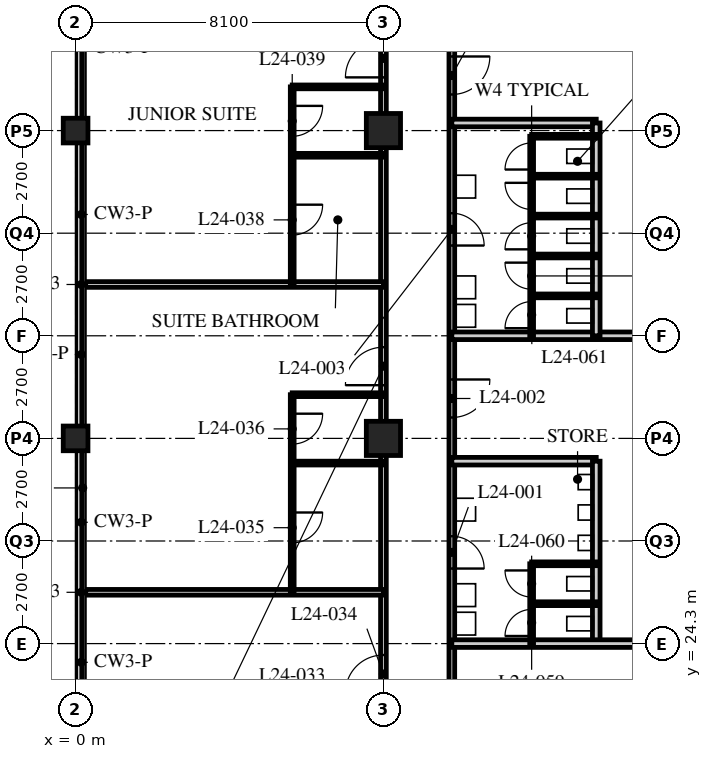
"""IFC4 building model, lengths in metres.
Left out: names, types, materials, properties, quantities, classifications, styles, units other than length and angle.
Written with IfcOpenShell. Run it as: python <this file> out.ifc"""

import sys

from ifc_helpers import new_model, si_unit, direction, frame, frame_2d, origin, origin_2d, place, context, subcontext, project, spatial, rectangle, hollow_rectangle, extrude, element, fill, save


model = new_model("IFC4")
c1 = context("Model", 3, precision=1e-05, world=origin(), true_north=direction((0.0, 1.0)))
c2 = subcontext(c1, "Body", "Model", "MODEL_VIEW")
j1 = project(units=[si_unit("LENGTHUNIT", "METRE"), si_unit("PLANEANGLEUNIT", "RADIAN")], contexts=[c1])
p1 = place(None, origin())
s1 = spatial("IfcSite", under=j1, at=p1, CompositionType="ELEMENT")
p2 = place(p1, origin())
s2 = spatial("IfcBuilding", under=s1, at=p2, CompositionType="ELEMENT")
p3 = place(p2, frame((0.0, 0.0, 98.0)))
s3 = spatial("IfcBuildingStorey", under=s2, at=p3, CompositionType="ELEMENT", Elevation=98.0)
for number, where, z_axis, x_axis in (
    (1, (0.0, 29.7, 0.0), (0.0, 0.0, 1.0), (1.0, 0.0, 0.0)),
    (2, (0.0, 37.8, 0.0), (0.0, 0.0, 1.0), (1.0, 0.0, 0.0)),
):
    element("IfcColumn", number, at=place(p3, frame(where, z_axis=z_axis, x_axis=x_axis)), inside=s3, PredefinedType="COLUMN", context=c2, shape_type="SweptSolid", body=[
        extrude(hollow_rectangle(XDim=0.65, YDim=0.65, WallThickness=0.05, at=origin_2d()), origin(), (0.0, 0.0, 1.0), 5.4),
    ])
for number, where, z_axis, x_axis in (
    (3, (8.1, 29.7, 0.0), (0.0, 0.0, 1.0), (1.0, 0.0, 0.0)),
    (4, (8.1, 37.8, 0.0), (0.0, 0.0, 1.0), (1.0, 0.0, 0.0)),
):
    element("IfcColumn", number, at=place(p3, frame(where, z_axis=z_axis, x_axis=x_axis)), inside=s3, PredefinedType="COLUMN", context=c2, shape_type="SweptSolid", body=[
        extrude(hollow_rectangle(XDim=0.9, YDim=0.9, WallThickness=0.1, at=origin_2d()), origin(), (0.0, 0.0, 1.0), 5.4),
    ])
p4 = place(p3, frame((8.1, 13.5, 0.0), z_axis=(0.0, 0.0, 1.0), x_axis=(0.0, 1.0, 0.0)))
e5 = element("IfcWall", 5, at=p4, inside=s3, PredefinedType="PARTITIONING", context=c2, shape_type="SweptSolid", body=[
    extrude(rectangle(XDim=32.435, YDim=0.15, at=frame_2d((16.218, 0.0))), origin(), (0.0, 0.0, 1.0), 4.49),
])
p5 = place(p4, frame((1.525, 0.0, 0.0)))
e6 = element("IfcOpeningElement", 6, at=p5, cuts=e5, PredefinedType="OPENING", context=c2, shape_type="SweptSolid", body=[
    extrude(rectangle(XDim=1.0, YDim=2.1, at=frame_2d((0.5, 1.05))), frame((0.0, 0.085, 0.0), z_axis=(0.0, -1.0, 0.0), x_axis=(1.0, 0.0, 0.0)), (0.0, 0.0, 1.0), 0.17),
])
p6 = place(p4, frame((9.5, 0.0, 0.0)))
e7 = element("IfcOpeningElement", 7, at=p6, cuts=e5, PredefinedType="OPENING", context=c2, shape_type="SweptSolid", body=[
    extrude(rectangle(XDim=1.0, YDim=2.1, at=frame_2d((0.5, 1.05))), frame((0.0, 0.085, 0.0), z_axis=(0.0, -1.0, 0.0), x_axis=(1.0, 0.0, 0.0)), (0.0, 0.0, 1.0), 0.17),
])
p7 = place(p4, frame((17.6, 0.0, 0.0)))
e8 = element("IfcOpeningElement", 8, at=p7, cuts=e5, PredefinedType="OPENING", context=c2, shape_type="SweptSolid", body=[
    extrude(rectangle(XDim=1.0, YDim=2.1, at=frame_2d((0.5, 1.05))), frame((0.0, 0.085, 0.0), z_axis=(0.0, -1.0, 0.0), x_axis=(1.0, 0.0, 0.0)), (0.0, 0.0, 1.0), 0.17),
])
p8 = place(p4, frame((25.7, 0.0, 0.0)))
e9 = element("IfcOpeningElement", 9, at=p8, cuts=e5, PredefinedType="OPENING", context=c2, shape_type="SweptSolid", body=[
    extrude(rectangle(XDim=1.0, YDim=2.1, at=frame_2d((0.5, 1.05))), frame((0.0, 0.085, 0.0), z_axis=(0.0, -1.0, 0.0), x_axis=(1.0, 0.0, 0.0)), (0.0, 0.0, 1.0), 0.17),
])
p9 = place(p4, frame((28.95, 0.0, 0.0)))
e10 = element("IfcOpeningElement", 10, at=p9, cuts=e5, PredefinedType="OPENING", context=c2, shape_type="SweptSolid", body=[
    extrude(rectangle(XDim=1.0, YDim=2.1, at=frame_2d((0.5, 1.05))), frame((0.0, 0.085, 0.0), z_axis=(0.0, -1.0, 0.0), x_axis=(1.0, 0.0, 0.0)), (0.0, 0.0, 1.0), 0.17),
])
p10 = place(p3, frame((9.9, 44.1, 0.0), z_axis=(0.0, 0.0, 1.0), x_axis=(0.0, -1.0, 0.0)))
e11 = element("IfcWall", 11, at=p10, inside=s3, PredefinedType="PARTITIONING", context=c2, shape_type="SweptSolid", body=[
    extrude(rectangle(XDim=28.8, YDim=0.15, at=frame_2d((14.4, 0.0))), origin(), (0.0, 0.0, 1.0), 5.19),
])
p11 = place(p10, frame((16.975, 0.0, 0.0)))
e12 = element("IfcOpeningElement", 12, at=p11, cuts=e11, PredefinedType="OPENING", context=c2, shape_type="SweptSolid", body=[
    extrude(rectangle(XDim=0.85, YDim=2.1, at=frame_2d((0.425, 1.05))), frame((0.0, 0.085, 0.0), z_axis=(0.0, -1.0, 0.0), x_axis=(1.0, 0.0, 0.0)), (0.0, 0.0, 1.0), 0.17),
])
p12 = place(p10, frame((12.85, 0.0, 0.0)))
e13 = element("IfcOpeningElement", 13, at=p12, cuts=e11, PredefinedType="OPENING", context=c2, shape_type="SweptSolid", body=[
    extrude(rectangle(XDim=1.0, YDim=2.1, at=frame_2d((0.5, 1.05))), frame((0.0, 0.085, 0.0), z_axis=(0.0, -1.0, 0.0), x_axis=(1.0, 0.0, 0.0)), (0.0, 0.0, 1.0), 0.17),
])
p13 = place(p10, frame((8.475, 0.0, 0.0)))
e14 = element("IfcOpeningElement", 14, at=p13, cuts=e11, PredefinedType="OPENING", context=c2, shape_type="SweptSolid", body=[
    extrude(rectangle(XDim=0.85, YDim=2.1, at=frame_2d((0.425, 1.05))), frame((0.0, 0.085, 0.0), z_axis=(0.0, -1.0, 0.0), x_axis=(1.0, 0.0, 0.0)), (0.0, 0.0, 1.0), 0.17),
])
p14 = place(p10, frame((4.35, 0.0, 0.0)))
e15 = element("IfcOpeningElement", 15, at=p14, cuts=e11, PredefinedType="OPENING", context=c2, shape_type="SweptSolid", body=[
    extrude(rectangle(XDim=1.0, YDim=2.1, at=frame_2d((0.5, 1.05))), frame((0.0, 0.085, 0.0), z_axis=(0.0, -1.0, 0.0), x_axis=(1.0, 0.0, 0.0)), (0.0, 0.0, 1.0), 0.17),
])
p15 = place(p3, frame((9.9, 32.4, 0.0), z_axis=(0.0, 0.0, 1.0), x_axis=(1.0, 0.0, 0.0)))
e16 = element("IfcWall", 16, at=p15, inside=s3, PredefinedType="SOLIDWALL", context=c2, shape_type="SweptSolid", body=[
    extrude(rectangle(XDim=6.3, YDim=0.2, at=frame_2d((3.15, 0.0))), origin(), (0.0, 0.0, 1.0), 5.19),
])
p16 = place(p3, frame((9.9, 29.1, 0.0), z_axis=(0.0, 0.0, 1.0), x_axis=(1.0, 0.0, 0.0)))
e17 = element("IfcWall", 17, at=p16, inside=s3, PredefinedType="SOLIDWALL", context=c2, shape_type="SweptSolid", body=[
    extrude(rectangle(XDim=3.8, YDim=0.2, at=frame_2d((1.9, 0.0))), origin(), (0.0, 0.0, 1.0), 5.19),
])
p17 = place(p3, frame((13.7, 24.3, 0.0), z_axis=(0.0, 0.0, 1.0), x_axis=(0.0, 1.0, 0.0)))
e18 = element("IfcWall", 18, at=p17, inside=s3, PredefinedType="SOLIDWALL", context=c2, shape_type="SweptSolid", body=[
    extrude(rectangle(XDim=4.8, YDim=0.2, at=frame_2d((2.4, 0.0))), origin(), (0.0, 0.0, 1.0), 5.19),
])
p18 = place(p3, frame((9.9, 38.0, 0.0), z_axis=(0.0, 0.0, 1.0), x_axis=(1.0, 0.0, 0.0)))
e19 = element("IfcWall", 19, at=p18, inside=s3, PredefinedType="SOLIDWALL", context=c2, shape_type="SweptSolid", body=[
    extrude(rectangle(XDim=3.8, YDim=0.2, at=frame_2d((1.9, 0.0))), origin(), (0.0, 0.0, 1.0), 4.49),
])
p19 = place(p3, frame((13.7, 32.4, 0.0), z_axis=(0.0, 0.0, 1.0), x_axis=(0.0, 1.0, 0.0)))
e20 = element("IfcWall", 20, at=p19, inside=s3, PredefinedType="SOLIDWALL", context=c2, shape_type="SweptSolid", body=[
    extrude(rectangle(XDim=5.6, YDim=0.2, at=frame_2d((2.8, 0.0))), origin(), (0.0, 0.0, 1.0), 5.19),
])
p20 = place(p3, frame((9.9, 24.3, 0.0), z_axis=(0.0, 0.0, 1.0), x_axis=(1.0, 0.0, 0.0)))
e21 = element("IfcWall", 21, at=p20, inside=s3, PredefinedType="SOLIDWALL", context=c2, shape_type="SweptSolid", body=[
    extrude(rectangle(XDim=6.3, YDim=0.2, at=frame_2d((3.15, 0.0))), origin(), (0.0, 0.0, 1.0), 5.19),
])
p21 = place(p3, frame((8.1, 25.65, 0.0), z_axis=(0.0, 0.0, 1.0), x_axis=(-1.0, 0.0, 0.0)))
e22 = element("IfcWall", 22, at=p21, inside=s3, PredefinedType="PARTITIONING", context=c2, shape_type="SweptSolid", body=[
    extrude(rectangle(XDim=7.835, YDim=0.15, at=frame_2d((3.917, 0.0))), origin(), (0.0, 0.0, 1.0), 5.19),
])
p22 = place(p3, frame((5.7, 25.65, 0.0), z_axis=(0.0, 0.0, 1.0), x_axis=(0.0, 1.0, 0.0)))
e23 = element("IfcWall", 23, at=p22, inside=s3, PredefinedType="PARTITIONING", context=c2, shape_type="SweptSolid", body=[
    extrude(rectangle(XDim=5.2, YDim=0.1, at=frame_2d((2.6, 0.0))), origin(), (0.0, 0.0, 1.0), 5.19),
])
p23 = place(p22, frame((1.3, 0.0, 0.0)))
e24 = element("IfcOpeningElement", 24, at=p23, cuts=e23, PredefinedType="OPENING", context=c2, shape_type="SweptSolid", body=[
    extrude(rectangle(XDim=0.8, YDim=2.1, at=frame_2d((0.4, 1.05))), frame((0.0, 0.06, 0.0), z_axis=(0.0, -1.0, 0.0), x_axis=(1.0, 0.0, 0.0)), (0.0, 0.0, 1.0), 0.12),
])
p24 = place(p22, frame((3.9, 0.0, 0.0)))
e25 = element("IfcOpeningElement", 25, at=p24, cuts=e23, PredefinedType="OPENING", context=c2, shape_type="SweptSolid", body=[
    extrude(rectangle(XDim=0.8, YDim=2.1, at=frame_2d((0.4, 1.05))), frame((0.0, 0.06, 0.0), z_axis=(0.0, -1.0, 0.0), x_axis=(1.0, 0.0, 0.0)), (0.0, 0.0, 1.0), 0.12),
])
for number, where, z_axis, x_axis in (
    (26, (8.1, 29.05, 0.0), (0.0, 0.0, 1.0), (-1.0, 0.0, 0.0)),
    (27, (8.1, 30.85, 0.0), (0.0, 0.0, 1.0), (-1.0, 0.0, 0.0)),
):
    element("IfcWall", number, at=place(p3, frame(where, z_axis=z_axis, x_axis=x_axis)), inside=s3, PredefinedType="PARTITIONING", context=c2, shape_type="SweptSolid", body=[
        extrude(rectangle(XDim=2.4, YDim=0.1, at=frame_2d((1.2, 0.0))), origin(), (0.0, 0.0, 1.0), 5.19),
    ])
p25 = place(p3, frame((8.1, 33.75, 0.0), z_axis=(0.0, 0.0, 1.0), x_axis=(-1.0, 0.0, 0.0)))
e28 = element("IfcWall", 28, at=p25, inside=s3, PredefinedType="PARTITIONING", context=c2, shape_type="SweptSolid", body=[
    extrude(rectangle(XDim=7.835, YDim=0.15, at=frame_2d((3.917, 0.0))), origin(), (0.0, 0.0, 1.0), 5.19),
])
p26 = place(p3, frame((5.7, 33.75, 0.0), z_axis=(0.0, 0.0, 1.0), x_axis=(0.0, 1.0, 0.0)))
e29 = element("IfcWall", 29, at=p26, inside=s3, PredefinedType="PARTITIONING", context=c2, shape_type="SweptSolid", body=[
    extrude(rectangle(XDim=5.2, YDim=0.1, at=frame_2d((2.6, 0.0))), origin(), (0.0, 0.0, 1.0), 5.19),
])
p27 = place(p26, frame((1.3, 0.0, 0.0)))
e30 = element("IfcOpeningElement", 30, at=p27, cuts=e29, PredefinedType="OPENING", context=c2, shape_type="SweptSolid", body=[
    extrude(rectangle(XDim=0.8, YDim=2.1, at=frame_2d((0.4, 1.05))), frame((0.0, 0.06, 0.0), z_axis=(0.0, -1.0, 0.0), x_axis=(1.0, 0.0, 0.0)), (0.0, 0.0, 1.0), 0.12),
])
p28 = place(p26, frame((3.9, 0.0, 0.0)))
e31 = element("IfcOpeningElement", 31, at=p28, cuts=e29, PredefinedType="OPENING", context=c2, shape_type="SweptSolid", body=[
    extrude(rectangle(XDim=0.8, YDim=2.1, at=frame_2d((0.4, 1.05))), frame((0.0, 0.06, 0.0), z_axis=(0.0, -1.0, 0.0), x_axis=(1.0, 0.0, 0.0)), (0.0, 0.0, 1.0), 0.12),
])
for number, where, z_axis, x_axis in (
    (32, (8.1, 37.15, 0.0), (0.0, 0.0, 1.0), (-1.0, 0.0, 0.0)),
    (33, (8.1, 38.95, 0.0), (0.0, 0.0, 1.0), (-1.0, 0.0, 0.0)),
):
    element("IfcWall", number, at=place(p3, frame(where, z_axis=z_axis, x_axis=x_axis)), inside=s3, PredefinedType="PARTITIONING", context=c2, shape_type="SweptSolid", body=[
        extrude(rectangle(XDim=2.4, YDim=0.1, at=frame_2d((1.2, 0.0))), origin(), (0.0, 0.0, 1.0), 5.19),
    ])
p29 = place(p3, frame((12.0, 24.3, 0.0), z_axis=(0.0, 0.0, 1.0), x_axis=(0.0, 1.0, 0.0)))
e34 = element("IfcWall", 34, at=p29, inside=s3, PredefinedType="PARTITIONING", context=c2, shape_type="SweptSolid", body=[
    extrude(rectangle(XDim=2.1, YDim=0.1, at=frame_2d((1.05, 0.0))), origin(), (0.0, 0.0, 1.0), 5.19),
])
p30 = place(p29, frame((0.2, 0.0, 0.0)))
e35 = element("IfcOpeningElement", 35, at=p30, cuts=e34, PredefinedType="OPENING", context=c2, shape_type="SweptSolid", body=[
    extrude(rectangle(XDim=0.7, YDim=2.0, at=frame_2d((0.35, 1.0))), frame((0.0, 0.06, 0.0), z_axis=(0.0, -1.0, 0.0), x_axis=(1.0, 0.0, 0.0)), (0.0, 0.0, 1.0), 0.12),
])
p31 = place(p29, frame((1.225, 0.0, 0.0)))
e36 = element("IfcOpeningElement", 36, at=p31, cuts=e34, PredefinedType="OPENING", context=c2, shape_type="SweptSolid", body=[
    extrude(rectangle(XDim=0.7, YDim=2.0, at=frame_2d((0.35, 1.0))), frame((0.0, 0.06, 0.0), z_axis=(0.0, -1.0, 0.0), x_axis=(1.0, 0.0, 0.0)), (0.0, 0.0, 1.0), 0.12),
])
for number, where, z_axis, x_axis in (
    (37, (12.0, 25.35, 0.0), (0.0, 0.0, 1.0), (1.0, 0.0, 0.0)),
    (38, (12.0, 26.4, 0.0), (0.0, 0.0, 1.0), (1.0, 0.0, 0.0)),
):
    element("IfcWall", number, at=place(p3, frame(where, z_axis=z_axis, x_axis=x_axis)), inside=s3, PredefinedType="PARTITIONING", context=c2, shape_type="SweptSolid", body=[
        extrude(rectangle(XDim=1.7, YDim=0.1, at=frame_2d((0.85, 0.0))), origin(), (0.0, 0.0, 1.0), 5.19),
    ])
p32 = place(p3, frame((12.0, 32.4, 0.0), z_axis=(0.0, 0.0, 1.0), x_axis=(0.0, 1.0, 0.0)))
e39 = element("IfcWall", 39, at=p32, inside=s3, PredefinedType="PARTITIONING", context=c2, shape_type="SweptSolid", body=[
    extrude(rectangle(XDim=5.25, YDim=0.1, at=frame_2d((2.625, 0.0))), origin(), (0.0, 0.0, 1.0), 5.19),
])
p33 = place(p32, frame((0.2, 0.0, 0.0)))
e40 = element("IfcOpeningElement", 40, at=p33, cuts=e39, PredefinedType="OPENING", context=c2, shape_type="SweptSolid", body=[
    extrude(rectangle(XDim=0.7, YDim=2.0, at=frame_2d((0.35, 1.0))), frame((0.0, 0.06, 0.0), z_axis=(0.0, -1.0, 0.0), x_axis=(1.0, 0.0, 0.0)), (0.0, 0.0, 1.0), 0.12),
])
p34 = place(p32, frame((1.225, 0.0, 0.0)))
e41 = element("IfcOpeningElement", 41, at=p34, cuts=e39, PredefinedType="OPENING", context=c2, shape_type="SweptSolid", body=[
    extrude(rectangle(XDim=0.7, YDim=2.0, at=frame_2d((0.35, 1.0))), frame((0.0, 0.06, 0.0), z_axis=(0.0, -1.0, 0.0), x_axis=(1.0, 0.0, 0.0)), (0.0, 0.0, 1.0), 0.12),
])
p35 = place(p32, frame((2.275, 0.0, 0.0)))
e42 = element("IfcOpeningElement", 42, at=p35, cuts=e39, PredefinedType="OPENING", context=c2, shape_type="SweptSolid", body=[
    extrude(rectangle(XDim=0.7, YDim=2.0, at=frame_2d((0.35, 1.0))), frame((0.0, 0.06, 0.0), z_axis=(0.0, -1.0, 0.0), x_axis=(1.0, 0.0, 0.0)), (0.0, 0.0, 1.0), 0.12),
])
p36 = place(p32, frame((3.325, 0.0, 0.0)))
e43 = element("IfcOpeningElement", 43, at=p36, cuts=e39, PredefinedType="OPENING", context=c2, shape_type="SweptSolid", body=[
    extrude(rectangle(XDim=0.7, YDim=2.0, at=frame_2d((0.35, 1.0))), frame((0.0, 0.06, 0.0), z_axis=(0.0, -1.0, 0.0), x_axis=(1.0, 0.0, 0.0)), (0.0, 0.0, 1.0), 0.12),
])
p37 = place(p32, frame((4.375, 0.0, 0.0)))
e44 = element("IfcOpeningElement", 44, at=p37, cuts=e39, PredefinedType="OPENING", context=c2, shape_type="SweptSolid", body=[
    extrude(rectangle(XDim=0.7, YDim=2.0, at=frame_2d((0.35, 1.0))), frame((0.0, 0.06, 0.0), z_axis=(0.0, -1.0, 0.0), x_axis=(1.0, 0.0, 0.0)), (0.0, 0.0, 1.0), 0.12),
])
for number, where, z_axis, x_axis in (
    (45, (12.0, 33.45, 0.0), (0.0, 0.0, 1.0), (1.0, 0.0, 0.0)),
    (46, (12.0, 34.5, 0.0), (0.0, 0.0, 1.0), (1.0, 0.0, 0.0)),
    (47, (12.0, 35.55, 0.0), (0.0, 0.0, 1.0), (1.0, 0.0, 0.0)),
    (48, (12.0, 36.6, 0.0), (0.0, 0.0, 1.0), (1.0, 0.0, 0.0)),
):
    element("IfcWall", number, at=place(p3, frame(where, z_axis=z_axis, x_axis=x_axis)), inside=s3, PredefinedType="PARTITIONING", context=c2, shape_type="SweptSolid", body=[
        extrude(rectangle(XDim=1.7, YDim=0.1, at=frame_2d((0.85, 0.0))), origin(), (0.0, 0.0, 1.0), 5.19),
    ])
p38 = place(p3, frame((12.0, 37.65, 0.0), z_axis=(0.0, 0.0, 1.0), x_axis=(1.0, 0.0, 0.0)))
e49 = element("IfcWall", 49, at=p38, inside=s3, PredefinedType="PARTITIONING", context=c2, shape_type="SweptSolid", body=[
    extrude(rectangle(XDim=1.7, YDim=0.1, at=frame_2d((0.85, 0.0))), origin(), (0.0, 0.0, 1.0), 4.49),
])
p39 = place(p11, origin())
e50 = element("IfcDoor", 50, at=p39, inside=s3, OperationType="SINGLE_SWING_RIGHT", PredefinedType="DOOR", context=c2, shape_type="SweptSolid", body=[
    extrude(rectangle(XDim=0.85, YDim=2.1, at=frame_2d((0.425, 1.05))), frame((0.0, 0.025, 0.0), z_axis=(0.0, -1.0, 0.0), x_axis=(1.0, 0.0, 0.0)), (0.0, 0.0, 1.0), 0.05),
])
fill(e12, e50)
p40 = place(p12, origin())
e51 = element("IfcDoor", 51, at=p40, inside=s3, OperationType="SINGLE_SWING_LEFT", PredefinedType="DOOR", context=c2, shape_type="SweptSolid", body=[
    extrude(rectangle(XDim=1.0, YDim=2.1, at=frame_2d((0.5, 1.05))), frame((0.0, 0.025, 0.0), z_axis=(0.0, -1.0, 0.0), x_axis=(1.0, 0.0, 0.0)), (0.0, 0.0, 1.0), 0.05),
])
fill(e13, e51)
p41 = place(p13, origin())
e52 = element("IfcDoor", 52, at=p41, inside=s3, OperationType="SINGLE_SWING_RIGHT", PredefinedType="DOOR", context=c2, shape_type="SweptSolid", body=[
    extrude(rectangle(XDim=0.85, YDim=2.1, at=frame_2d((0.425, 1.05))), frame((0.0, 0.025, 0.0), z_axis=(0.0, -1.0, 0.0), x_axis=(1.0, 0.0, 0.0)), (0.0, 0.0, 1.0), 0.05),
])
fill(e14, e52)
p42 = place(p14, origin())
e53 = element("IfcDoor", 53, at=p42, inside=s3, OperationType="SINGLE_SWING_LEFT", PredefinedType="DOOR", context=c2, shape_type="SweptSolid", body=[
    extrude(rectangle(XDim=1.0, YDim=2.1, at=frame_2d((0.5, 1.05))), frame((0.0, 0.025, 0.0), z_axis=(0.0, -1.0, 0.0), x_axis=(1.0, 0.0, 0.0)), (0.0, 0.0, 1.0), 0.05),
])
fill(e15, e53)
p43 = place(p6, origin())
e54 = element("IfcDoor", 54, at=p43, inside=s3, OperationType="SINGLE_SWING_LEFT", PredefinedType="DOOR", context=c2, shape_type="SweptSolid", body=[
    extrude(rectangle(XDim=1.0, YDim=2.1, at=frame_2d((0.5, 1.05))), frame((0.0, 0.025, 0.0), z_axis=(0.0, -1.0, 0.0), x_axis=(1.0, 0.0, 0.0)), (0.0, 0.0, 1.0), 0.05),
])
fill(e7, e54)
p44 = place(p23, origin())
e55 = element("IfcDoor", 55, at=p44, inside=s3, OperationType="SINGLE_SWING_LEFT", PredefinedType="DOOR", context=c2, shape_type="SweptSolid", body=[
    extrude(rectangle(XDim=0.8, YDim=2.1, at=frame_2d((0.4, 1.05))), frame((0.0, 0.025, 0.0), z_axis=(0.0, -1.0, 0.0), x_axis=(1.0, 0.0, 0.0)), (0.0, 0.0, 1.0), 0.05),
])
fill(e24, e55)
p45 = place(p24, origin())
e56 = element("IfcDoor", 56, at=p45, inside=s3, OperationType="SINGLE_SWING_LEFT", PredefinedType="DOOR", context=c2, shape_type="SweptSolid", body=[
    extrude(rectangle(XDim=0.8, YDim=2.1, at=frame_2d((0.4, 1.05))), frame((0.0, 0.025, 0.0), z_axis=(0.0, -1.0, 0.0), x_axis=(1.0, 0.0, 0.0)), (0.0, 0.0, 1.0), 0.05),
])
fill(e25, e56)
p46 = place(p7, origin())
e57 = element("IfcDoor", 57, at=p46, inside=s3, OperationType="SINGLE_SWING_LEFT", PredefinedType="DOOR", context=c2, shape_type="SweptSolid", body=[
    extrude(rectangle(XDim=1.0, YDim=2.1, at=frame_2d((0.5, 1.05))), frame((0.0, 0.025, 0.0), z_axis=(0.0, -1.0, 0.0), x_axis=(1.0, 0.0, 0.0)), (0.0, 0.0, 1.0), 0.05),
])
fill(e8, e57)
p47 = place(p27, origin())
e58 = element("IfcDoor", 58, at=p47, inside=s3, OperationType="SINGLE_SWING_LEFT", PredefinedType="DOOR", context=c2, shape_type="SweptSolid", body=[
    extrude(rectangle(XDim=0.8, YDim=2.1, at=frame_2d((0.4, 1.05))), frame((0.0, 0.025, 0.0), z_axis=(0.0, -1.0, 0.0), x_axis=(1.0, 0.0, 0.0)), (0.0, 0.0, 1.0), 0.05),
])
fill(e30, e58)
p48 = place(p28, origin())
e59 = element("IfcDoor", 59, at=p48, inside=s3, OperationType="SINGLE_SWING_LEFT", PredefinedType="DOOR", context=c2, shape_type="SweptSolid", body=[
    extrude(rectangle(XDim=0.8, YDim=2.1, at=frame_2d((0.4, 1.05))), frame((0.0, 0.025, 0.0), z_axis=(0.0, -1.0, 0.0), x_axis=(1.0, 0.0, 0.0)), (0.0, 0.0, 1.0), 0.05),
])
fill(e31, e59)
p49 = place(p8, origin())
e60 = element("IfcDoor", 60, at=p49, inside=s3, OperationType="SINGLE_SWING_LEFT", PredefinedType="DOOR", context=c2, shape_type="SweptSolid", body=[
    extrude(rectangle(XDim=1.0, YDim=2.1, at=frame_2d((0.5, 1.05))), frame((0.0, 0.025, 0.0), z_axis=(0.0, -1.0, 0.0), x_axis=(1.0, 0.0, 0.0)), (0.0, 0.0, 1.0), 0.05),
])
fill(e9, e60)
p50 = place(p30, origin())
e61 = element("IfcDoor", 61, at=p50, inside=s3, OperationType="SINGLE_SWING_LEFT", PredefinedType="DOOR", context=c2, shape_type="SweptSolid", body=[
    extrude(rectangle(XDim=0.7, YDim=2.0, at=frame_2d((0.35, 1.0))), frame((0.0, 0.025, 0.0), z_axis=(0.0, -1.0, 0.0), x_axis=(1.0, 0.0, 0.0)), (0.0, 0.0, 1.0), 0.05),
])
fill(e35, e61)
p51 = place(p31, origin())
e62 = element("IfcDoor", 62, at=p51, inside=s3, OperationType="SINGLE_SWING_RIGHT", PredefinedType="DOOR", context=c2, shape_type="SweptSolid", body=[
    extrude(rectangle(XDim=0.7, YDim=2.0, at=frame_2d((0.35, 1.0))), frame((0.0, 0.025, 0.0), z_axis=(0.0, -1.0, 0.0), x_axis=(1.0, 0.0, 0.0)), (0.0, 0.0, 1.0), 0.05),
])
fill(e36, e62)
p52 = place(p33, origin())
e63 = element("IfcDoor", 63, at=p52, inside=s3, OperationType="SINGLE_SWING_LEFT", PredefinedType="DOOR", context=c2, shape_type="SweptSolid", body=[
    extrude(rectangle(XDim=0.7, YDim=2.0, at=frame_2d((0.35, 1.0))), frame((0.0, 0.025, 0.0), z_axis=(0.0, -1.0, 0.0), x_axis=(1.0, 0.0, 0.0)), (0.0, 0.0, 1.0), 0.05),
])
fill(e40, e63)
p53 = place(p34, origin())
e64 = element("IfcDoor", 64, at=p53, inside=s3, OperationType="SINGLE_SWING_RIGHT", PredefinedType="DOOR", context=c2, shape_type="SweptSolid", body=[
    extrude(rectangle(XDim=0.7, YDim=2.0, at=frame_2d((0.35, 1.0))), frame((0.0, 0.025, 0.0), z_axis=(0.0, -1.0, 0.0), x_axis=(1.0, 0.0, 0.0)), (0.0, 0.0, 1.0), 0.05),
])
fill(e41, e64)
p54 = place(p35, origin())
e65 = element("IfcDoor", 65, at=p54, inside=s3, OperationType="SINGLE_SWING_LEFT", PredefinedType="DOOR", context=c2, shape_type="SweptSolid", body=[
    extrude(rectangle(XDim=0.7, YDim=2.0, at=frame_2d((0.35, 1.0))), frame((0.0, 0.025, 0.0), z_axis=(0.0, -1.0, 0.0), x_axis=(1.0, 0.0, 0.0)), (0.0, 0.0, 1.0), 0.05),
])
fill(e42, e65)
p55 = place(p36, origin())
e66 = element("IfcDoor", 66, at=p55, inside=s3, OperationType="SINGLE_SWING_RIGHT", PredefinedType="DOOR", context=c2, shape_type="SweptSolid", body=[
    extrude(rectangle(XDim=0.7, YDim=2.0, at=frame_2d((0.35, 1.0))), frame((0.0, 0.025, 0.0), z_axis=(0.0, -1.0, 0.0), x_axis=(1.0, 0.0, 0.0)), (0.0, 0.0, 1.0), 0.05),
])
fill(e43, e66)
p56 = place(p37, origin())
e67 = element("IfcDoor", 67, at=p56, inside=s3, OperationType="SINGLE_SWING_LEFT", PredefinedType="DOOR", context=c2, shape_type="SweptSolid", body=[
    extrude(rectangle(XDim=0.7, YDim=2.0, at=frame_2d((0.35, 1.0))), frame((0.0, 0.025, 0.0), z_axis=(0.0, -1.0, 0.0), x_axis=(1.0, 0.0, 0.0)), (0.0, 0.0, 1.0), 0.05),
])
fill(e44, e67)
save(model, sys.argv[1])
